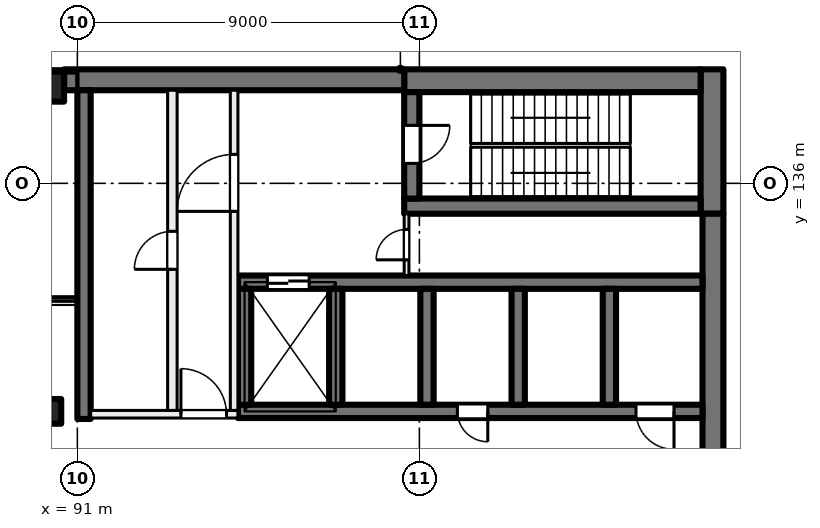
"""IFC4 building model, lengths in metres.
Left out: names, types, materials, properties, quantities, classifications, styles, units other than length and angle.
Written with IfcOpenShell. Run it as: python <this file> out.ifc"""

import sys

from ifc_helpers import new_model, si_unit, direction, frame, frame_2d, origin, origin_2d, place, context, subcontext, project, spatial, rectangle, extrude, element, fill, save


model = new_model("IFC4")
c1 = context("Model", 3, precision=1e-05, world=origin(), true_north=direction((0.0, 1.0)))
c2 = subcontext(c1, "Body", "Model", "MODEL_VIEW")
j1 = project(units=[si_unit("LENGTHUNIT", "METRE"), si_unit("PLANEANGLEUNIT", "RADIAN")], contexts=[c1])
p1 = place(None, origin())
s1 = spatial("IfcSite", under=j1, at=p1, CompositionType="ELEMENT")
p2 = place(p1, origin())
s2 = spatial("IfcBuilding", under=s1, at=p2, CompositionType="ELEMENT")
p3 = place(p2, frame((0.0, 0.0, 182.5)))
s3 = spatial("IfcBuildingStorey", under=s2, at=p3, CompositionType="ELEMENT", Elevation=182.5)
p4 = place(p3, frame((90.25, 130.0, 0.0), z_axis=(0.0, 0.0, 1.0), x_axis=(1.0, 0.0, 0.0)))
e1 = element("IfcColumn", 1, at=p4, inside=s3, PredefinedType="COLUMN", context=c2, shape_type="SweptSolid", body=[
    extrude(rectangle(XDim=0.65, YDim=0.65, at=origin_2d()), origin(), (0.0, 0.0, 1.0), 5.5),
])
p5 = place(p3, frame((90.25, 138.55, 0.0), z_axis=(0.0, 0.0, 1.0), x_axis=(1.0, 0.0, 0.0)))
e2 = element("IfcColumn", 2, at=p5, inside=s3, PredefinedType="COLUMN", context=c2, shape_type="SweptSolid", body=[
    extrude(rectangle(XDim=0.8, YDim=0.8, at=origin_2d()), origin(), (0.0, 0.0, 1.0), 5.5),
])
p6 = place(p3, frame((107.7, 139.0, 0.0), z_axis=(0.0, 0.0, 1.0), x_axis=(0.0, -1.0, 0.0)))
e3 = element("IfcWall", 3, at=p6, inside=s3, PredefinedType="SHEAR", context=c2, shape_type="SweptSolid", body=[
    extrude(rectangle(XDim=3.8, YDim=0.6, at=frame_2d((1.9, 0.0))), origin(), (0.0, 0.0, 1.0), 5.5),
])
p7 = place(p3, frame((107.725, 135.2, 0.0), z_axis=(0.0, 0.0, 1.0), x_axis=(0.0, -1.0, 0.0)))
e4 = element("IfcWall", 4, at=p7, inside=s3, PredefinedType="SHEAR", context=c2, shape_type="SweptSolid", body=[
    extrude(rectangle(XDim=14.4, YDim=0.55, at=frame_2d((7.2, 0.0))), origin(), (0.0, 0.0, 1.0), 5.5),
])
p8 = place(p3, frame((107.4, 138.7, 0.0), z_axis=(0.0, 0.0, 1.0), x_axis=(-1.0, 0.0, 0.0)))
e5 = element("IfcWall", 5, at=p8, inside=s3, PredefinedType="SHEAR", context=c2, shape_type="SweptSolid", body=[
    extrude(rectangle(XDim=7.8, YDim=0.6, at=frame_2d((3.9, 0.0))), origin(), (0.0, 0.0, 1.0), 5.5),
])
p9 = place(p3, frame((99.6, 138.725, 0.0), z_axis=(0.0, 0.0, 1.0), x_axis=(-1.0, 0.0, 0.0)))
e6 = element("IfcWall", 6, at=p9, inside=s3, PredefinedType="SHEAR", context=c2, shape_type="SweptSolid", body=[
    extrude(rectangle(XDim=8.95, YDim=0.55, at=frame_2d((4.475, 0.0))), origin(), (0.0, 0.0, 1.0), 5.5),
])
p10 = place(p3, frame((107.4, 135.4, 0.0), z_axis=(0.0, 0.0, 1.0), x_axis=(-1.0, 0.0, 0.0)))
e7 = element("IfcWall", 7, at=p10, inside=s3, PredefinedType="SHEAR", context=c2, shape_type="SweptSolid", body=[
    extrude(rectangle(XDim=7.8, YDim=0.4, at=frame_2d((3.9, 0.0))), origin(), (0.0, 0.0, 1.0), 5.5),
])
p11 = place(p3, frame((99.8, 138.4, 0.0), z_axis=(0.0, 0.0, 1.0), x_axis=(0.0, -1.0, 0.0)))
e8 = element("IfcWall", 8, at=p11, inside=s3, PredefinedType="SHEAR", context=c2, shape_type="SweptSolid", body=[
    extrude(rectangle(XDim=2.8, YDim=0.4, at=frame_2d((1.4, 0.0))), origin(), (0.0, 0.0, 1.0), 5.5),
])
p12 = place(p11, frame((0.875, 0.0, 0.0)))
e9 = element("IfcOpeningElement", 9, at=p12, cuts=e8, PredefinedType="OPENING", context=c2, shape_type="SweptSolid", body=[
    extrude(rectangle(XDim=1.0, YDim=2.1, at=frame_2d((0.5, 1.05))), frame((0.0, 0.21, 0.0), z_axis=(0.0, -1.0, 0.0), x_axis=(1.0, 0.0, 0.0)), (0.0, 0.0, 1.0), 0.42),
])
p13 = place(p3, frame((107.45, 130.0, 0.0), z_axis=(0.0, 0.0, 1.0), x_axis=(-1.0, 0.0, 0.0)))
e10 = element("IfcWall", 10, at=p13, inside=s3, PredefinedType="SHEAR", context=c2, shape_type="SweptSolid", body=[
    extrude(rectangle(XDim=12.225, YDim=0.35, at=frame_2d((6.112, 0.0))), origin(), (0.0, 0.0, 1.0), 5.5),
])
p14 = place(p13, frame((0.75, 0.0, 0.0)))
e11 = element("IfcOpeningElement", 11, at=p14, cuts=e10, PredefinedType="OPENING", context=c2, shape_type="SweptSolid", body=[
    extrude(rectangle(XDim=1.0, YDim=2.1, at=frame_2d((0.5, 1.05))), frame((0.0, 0.185, 0.0), z_axis=(0.0, -1.0, 0.0), x_axis=(1.0, 0.0, 0.0)), (0.0, 0.0, 1.0), 0.37),
])
p15 = place(p13, frame((5.65, 0.0, 0.0)))
e12 = element("IfcOpeningElement", 12, at=p15, cuts=e10, PredefinedType="OPENING", context=c2, shape_type="SweptSolid", body=[
    extrude(rectangle(XDim=0.8, YDim=2.1, at=frame_2d((0.4, 1.05))), frame((0.0, 0.185, 0.0), z_axis=(0.0, -1.0, 0.0), x_axis=(1.0, 0.0, 0.0)), (0.0, 0.0, 1.0), 0.37),
])
p16 = place(p3, frame((107.45, 133.4, 0.0), z_axis=(0.0, 0.0, 1.0), x_axis=(-1.0, 0.0, 0.0)))
e13 = element("IfcWall", 13, at=p16, inside=s3, PredefinedType="SHEAR", context=c2, shape_type="SweptSolid", body=[
    extrude(rectangle(XDim=12.225, YDim=0.35, at=frame_2d((6.112, 0.0))), origin(), (0.0, 0.0, 1.0), 5.5),
])
p17 = place(p16, frame((10.35, 0.0, 0.0)))
e14 = element("IfcOpeningElement", 14, at=p17, cuts=e13, PredefinedType="OPENING", context=c2, shape_type="SweptSolid", body=[
    extrude(rectangle(XDim=1.1, YDim=2.1, at=frame_2d((0.55, 1.05))), frame((0.0, 0.185, 0.0), z_axis=(0.0, -1.0, 0.0), x_axis=(1.0, 0.0, 0.0)), (0.0, 0.0, 1.0), 0.37),
])
for number, where, z_axis, x_axis in (
    (15, (105.0, 133.225, 0.0), (0.0, 0.0, 1.0), (0.0, -1.0, 0.0)),
    (16, (102.6, 133.225, 0.0), (0.0, 0.0, 1.0), (0.0, -1.0, 0.0)),
    (17, (100.2, 133.225, 0.0), (0.0, 0.0, 1.0), (0.0, -1.0, 0.0)),
    (18, (97.8, 133.225, 0.0), (0.0, 0.0, 1.0), (0.0, -1.0, 0.0)),
    (19, (95.4, 133.225, 0.0), (0.0, 0.0, 1.0), (0.0, -1.0, 0.0)),
):
    element("IfcWall", number, at=place(p3, frame(where, z_axis=z_axis, x_axis=x_axis)), inside=s3, PredefinedType="SHEAR", context=c2, shape_type="SweptSolid", body=[
        extrude(rectangle(XDim=3.05, YDim=0.35, at=frame_2d((1.525, 0.0))), origin(), (0.0, 0.0, 1.0), 5.5),
    ])
p18 = place(p3, frame((91.175, 138.45, 0.0), z_axis=(0.0, 0.0, 1.0), x_axis=(0.0, -1.0, 0.0)))
e20 = element("IfcWall", 20, at=p18, inside=s3, PredefinedType="SHEAR", context=c2, shape_type="SweptSolid", body=[
    extrude(rectangle(XDim=8.65, YDim=0.35, at=frame_2d((4.325, 0.0))), origin(), (0.0, 0.0, 1.0), 5.5),
])
p19 = place(p3, frame((91.35, 129.925, 0.0), z_axis=(0.0, 0.0, 1.0), x_axis=(1.0, 0.0, 0.0)))
e21 = element("IfcWall", 21, at=p19, inside=s3, PredefinedType="PARTITIONING", context=c2, shape_type="SweptSolid", body=[
    extrude(rectangle(XDim=3.875, YDim=0.2, at=frame_2d((1.938, 0.0))), origin(), (0.0, 0.0, 1.0), 5.125),
])
p20 = place(p19, frame((2.375, 0.0, 0.0)))
e22 = element("IfcOpeningElement", 22, at=p20, cuts=e21, PredefinedType="OPENING", context=c2, shape_type="SweptSolid", body=[
    extrude(rectangle(XDim=1.2, YDim=2.1, at=frame_2d((0.6, 1.05))), frame((0.0, 0.11, 0.0), z_axis=(0.0, -1.0, 0.0), x_axis=(1.0, 0.0, 0.0)), (0.0, 0.0, 1.0), 0.22),
])
p21 = place(p3, frame((95.125, 130.025, 0.0), z_axis=(0.0, 0.0, 1.0), x_axis=(0.0, 1.0, 0.0)))
e23 = element("IfcWall", 23, at=p21, inside=s3, PredefinedType="PARTITIONING", context=c2, shape_type="SweptSolid", body=[
    extrude(rectangle(XDim=8.425, YDim=0.2, at=frame_2d((4.212, 0.0))), origin(), (0.0, 0.0, 1.0), 5.125),
])
p22 = place(p21, frame((5.238, 0.0, 0.0)))
e24 = element("IfcOpeningElement", 24, at=p22, cuts=e23, PredefinedType="OPENING", context=c2, shape_type="SweptSolid", body=[
    extrude(rectangle(XDim=1.5, YDim=2.1, at=frame_2d((0.75, 1.05))), frame((0.0, 0.11, 0.0), z_axis=(0.0, -1.0, 0.0), x_axis=(1.0, 0.0, 0.0)), (0.0, 0.0, 1.0), 0.22),
])
p23 = place(p3, frame((93.5, 130.025, 0.0), z_axis=(0.0, 0.0, 1.0), x_axis=(0.0, 1.0, 0.0)))
e25 = element("IfcWall", 25, at=p23, inside=s3, PredefinedType="PARTITIONING", context=c2, shape_type="SweptSolid", body=[
    extrude(rectangle(XDim=8.425, YDim=0.25, at=frame_2d((4.212, 0.0))), origin(), (0.0, 0.0, 1.0), 5.125),
])
p24 = place(p23, frame((3.712, 0.0, 0.0)))
e26 = element("IfcOpeningElement", 26, at=p24, cuts=e25, PredefinedType="OPENING", context=c2, shape_type="SweptSolid", body=[
    extrude(rectangle(XDim=1.0, YDim=2.1, at=frame_2d((0.5, 1.05))), frame((0.0, 0.135, 0.0), z_axis=(0.0, -1.0, 0.0), x_axis=(1.0, 0.0, 0.0)), (0.0, 0.0, 1.0), 0.27),
])
p25 = place(p3, frame((99.663, 133.575, 0.0), z_axis=(0.0, 0.0, 1.0), x_axis=(0.0, 1.0, 0.0)))
e27 = element("IfcWall", 27, at=p25, inside=s3, PredefinedType="PARTITIONING", context=c2, shape_type="SweptSolid", body=[
    extrude(rectangle(XDim=1.625, YDim=0.125, at=frame_2d((0.812, 0.0))), origin(), (0.0, 0.0, 1.0), 5.125),
])
p26 = place(p25, frame((0.413, 0.0, 0.0)))
e28 = element("IfcOpeningElement", 28, at=p26, cuts=e27, PredefinedType="OPENING", context=c2, shape_type="SweptSolid", body=[
    extrude(rectangle(XDim=0.8, YDim=2.1, at=frame_2d((0.4, 1.05))), frame((0.0, 0.073, 0.0), z_axis=(0.0, -1.0, 0.0), x_axis=(1.0, 0.0, 0.0)), (0.0, 0.0, 1.0), 0.145),
])
p27 = place(p14, origin())
e29 = element("IfcDoor", 29, at=p27, inside=s3, OperationType="SINGLE_SWING_LEFT", PredefinedType="DOOR", context=c2, shape_type="SweptSolid", body=[
    extrude(rectangle(XDim=1.0, YDim=2.1, at=frame_2d((0.5, 1.05))), frame((0.0, 0.025, 0.0), z_axis=(0.0, -1.0, 0.0), x_axis=(1.0, 0.0, 0.0)), (0.0, 0.0, 1.0), 0.05),
])
fill(e11, e29)
p28 = place(p15, origin())
e30 = element("IfcDoor", 30, at=p28, inside=s3, OperationType="SINGLE_SWING_RIGHT", PredefinedType="DOOR", context=c2, shape_type="SweptSolid", body=[
    extrude(rectangle(XDim=0.8, YDim=2.1, at=frame_2d((0.4, 1.05))), frame((0.0, 0.025, 0.0), z_axis=(0.0, -1.0, 0.0), x_axis=(1.0, 0.0, 0.0)), (0.0, 0.0, 1.0), 0.05),
])
fill(e12, e30)
p29 = place(p20, origin())
e31 = element("IfcDoor", 31, at=p29, inside=s3, OperationType="DOUBLE_DOOR_SINGLE_SWING", PredefinedType="DOOR", context=c2, shape_type="SweptSolid", body=[
    extrude(rectangle(XDim=1.2, YDim=2.1, at=frame_2d((0.6, 1.05))), frame((0.0, 0.025, 0.0), z_axis=(0.0, -1.0, 0.0), x_axis=(1.0, 0.0, 0.0)), (0.0, 0.0, 1.0), 0.05),
])
fill(e22, e31)
p30 = place(p22, origin())
e32 = element("IfcDoor", 32, at=p30, inside=s3, OperationType="DOUBLE_DOOR_SINGLE_SWING", PredefinedType="DOOR", context=c2, shape_type="SweptSolid", body=[
    extrude(rectangle(XDim=1.5, YDim=2.1, at=frame_2d((0.75, 1.05))), frame((0.0, 0.025, 0.0), z_axis=(0.0, -1.0, 0.0), x_axis=(1.0, 0.0, 0.0)), (0.0, 0.0, 1.0), 0.05),
])
fill(e24, e32)
p31 = place(p12, origin())
e33 = element("IfcDoor", 33, at=p31, inside=s3, OperationType="SINGLE_SWING_RIGHT", PredefinedType="DOOR", context=c2, shape_type="SweptSolid", body=[
    extrude(rectangle(XDim=1.0, YDim=2.1, at=frame_2d((0.5, 1.05))), frame((0.0, 0.025, 0.0), z_axis=(0.0, -1.0, 0.0), x_axis=(1.0, 0.0, 0.0)), (0.0, 0.0, 1.0), 0.05),
])
fill(e9, e33)
p32 = place(p26, origin())
e34 = element("IfcDoor", 34, at=p32, inside=s3, OperationType="SINGLE_SWING_LEFT", PredefinedType="DOOR", context=c2, shape_type="SweptSolid", body=[
    extrude(rectangle(XDim=0.8, YDim=2.1, at=frame_2d((0.4, 1.05))), frame((0.0, 0.025, 0.0), z_axis=(0.0, -1.0, 0.0), x_axis=(1.0, 0.0, 0.0)), (0.0, 0.0, 1.0), 0.05),
])
fill(e28, e34)
p33 = place(p24, origin())
e35 = element("IfcDoor", 35, at=p33, inside=s3, OperationType="SINGLE_SWING_RIGHT", PredefinedType="DOOR", context=c2, shape_type="SweptSolid", body=[
    extrude(rectangle(XDim=1.0, YDim=2.1, at=frame_2d((0.5, 1.05))), frame((0.0, 0.025, 0.0), z_axis=(0.0, -1.0, 0.0), x_axis=(1.0, 0.0, 0.0)), (0.0, 0.0, 1.0), 0.05),
])
fill(e26, e35)
p34 = place(p17, origin())
e36 = element("IfcDoor", 36, at=p34, inside=s3, OperationType="DOUBLE_DOOR_SLIDING", PredefinedType="DOOR", context=c2, shape_type="SweptSolid", body=[
    extrude(rectangle(XDim=1.1, YDim=2.1, at=frame_2d((0.55, 1.05))), frame((0.0, 0.025, 0.0), z_axis=(0.0, -1.0, 0.0), x_axis=(1.0, 0.0, 0.0)), (0.0, 0.0, 1.0), 0.05),
])
fill(e14, e36)
save(model, sys.argv[1])
